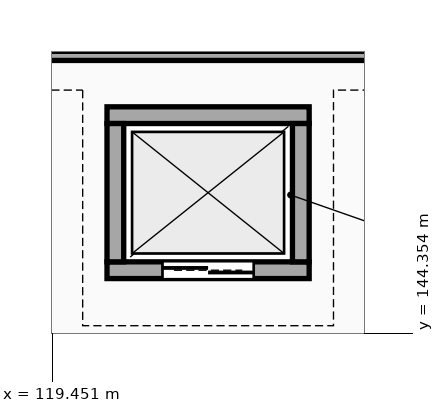
"""IFC4 building model, lengths in metres.
Left out: names, types, materials, properties, quantities, classifications, styles, units other than length and angle.
Written with IfcOpenShell. Run it as: python <this file> out.ifc"""

import sys

from ifc_helpers import new_model, si_unit, direction, frame, frame_2d, origin, place, context, subcontext, project, spatial, rectangle, extrude, element, fill, save


model = new_model("IFC4")
c1 = context("Model", 3, precision=1e-05, world=origin(), true_north=direction((0.0, 1.0)))
c2 = subcontext(c1, "Body", "Model", "MODEL_VIEW")
j1 = project(units=[si_unit("LENGTHUNIT", "METRE"), si_unit("PLANEANGLEUNIT", "RADIAN")], contexts=[c1])
p1 = place(None, origin())
s1 = spatial("IfcSite", under=j1, at=p1, CompositionType="ELEMENT")
p2 = place(p1, origin())
s2 = spatial("IfcBuilding", under=s1, at=p2, CompositionType="ELEMENT")
p3 = place(p2, frame((0.0, 0.0, 15.3)))
s3 = spatial("IfcBuildingStorey", under=s2, at=p3, CompositionType="ELEMENT", Elevation=15.3)
p4 = place(p3, frame((120.17, 145.18, 0.0), z_axis=(0.0, 0.0, 1.0), x_axis=(1.0, 0.0, 0.0)))
e1 = element("IfcWall", 1, at=p4, inside=s3, PredefinedType="STANDARD", context=c2, shape_type="SweptSolid", body=[
    extrude(rectangle(XDim=2.66, YDim=0.22, at=frame_2d((1.33, 0.0))), origin(), (0.0, 0.0, 1.0), 4.2),
])
p5 = place(p4, frame((0.73, 0.0, 0.0)))
e2 = element("IfcOpeningElement", 2, at=p5, cuts=e1, PredefinedType="OPENING", context=c2, shape_type="SweptSolid", body=[
    extrude(rectangle(XDim=1.2, YDim=2.2, at=frame_2d((0.6, 1.1))), frame((0.0, 0.12, 0.0), z_axis=(0.0, -1.0, 0.0), x_axis=(1.0, 0.0, 0.0)), (0.0, 0.0, 1.0), 0.24),
])
p6 = place(p3, frame((122.83, 147.22, 0.0), z_axis=(0.0, 0.0, 1.0), x_axis=(-1.0, 0.0, 0.0)))
e3 = element("IfcWall", 3, at=p6, inside=s3, PredefinedType="STANDARD", context=c2, shape_type="SweptSolid", body=[
    extrude(rectangle(XDim=2.66, YDim=0.22, at=frame_2d((1.33, 0.0))), origin(), (0.0, 0.0, 1.0), 4.2),
])
for number, where, z_axis, x_axis in (
    (4, (120.28, 147.11, 0.0), (0.0, 0.0, 1.0), (0.0, -1.0, 0.0)),
    (5, (122.72, 145.29, 0.0), (0.0, 0.0, 1.0), (0.0, 1.0, 0.0)),
):
    element("IfcWall", number, at=place(p3, frame(where, z_axis=z_axis, x_axis=x_axis)), inside=s3, PredefinedType="STANDARD", context=c2, shape_type="SweptSolid", body=[
        extrude(rectangle(XDim=1.82, YDim=0.22, at=frame_2d((0.91, 0.0))), origin(), (0.0, 0.0, 1.0), 4.2),
    ])
p7 = place(p3, frame((117.0, 148.0, 0.0), z_axis=(0.0, 0.0, 1.0), x_axis=(1.0, 0.0, 0.0)))
e6 = element("IfcWall", 6, at=p7, inside=s3, PredefinedType="PARTITIONING", context=c2, shape_type="SweptSolid", body=[
    extrude(rectangle(XDim=9.0, YDim=0.12, at=frame_2d((4.5, 0.0))), origin(), (0.0, 0.0, 1.0), 3.588),
])
p8 = place(p5, origin())
e7 = element("IfcDoor", 7, at=p8, inside=s3, OperationType="DOUBLE_DOOR_SLIDING", PredefinedType="DOOR", context=c2, shape_type="SweptSolid", body=[
    extrude(rectangle(XDim=1.2, YDim=2.2, at=frame_2d((0.6, 1.1))), frame((0.0, 0.025, 0.0), z_axis=(0.0, -1.0, 0.0), x_axis=(1.0, 0.0, 0.0)), (0.0, 0.0, 1.0), 0.05),
])
fill(e2, e7)
save(model, sys.argv[1])
